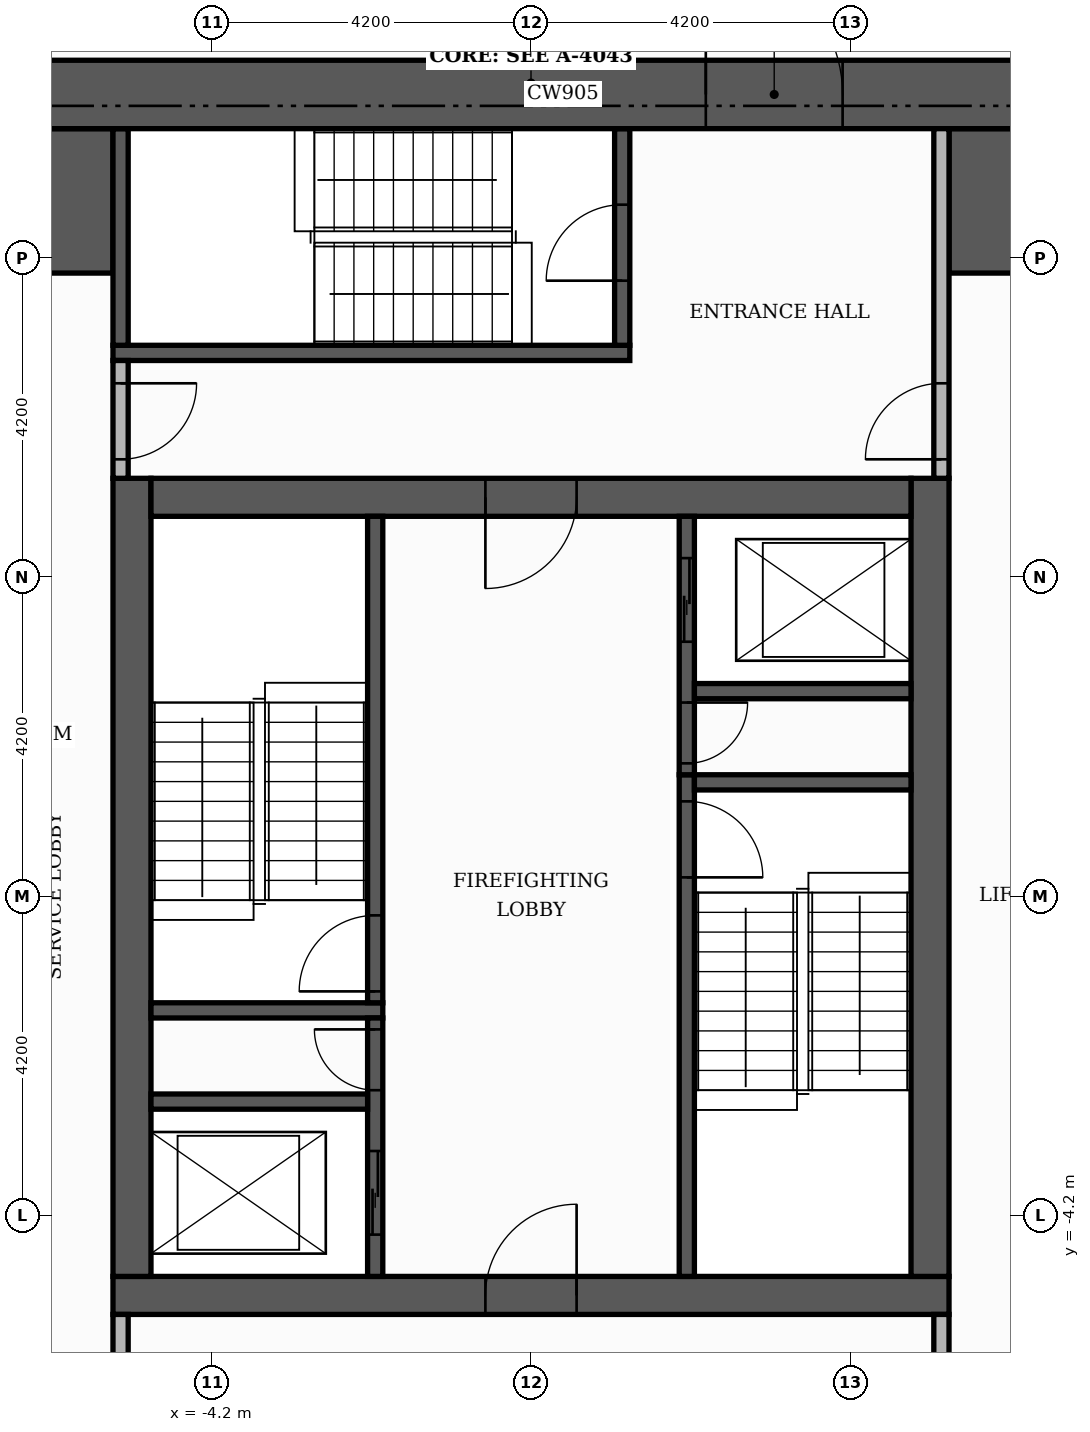
"""IFC4 building model, lengths in metres.
Left out: names, types, materials, properties, quantities, classifications, styles, units other than length and angle.
Written with IfcOpenShell. Run it as: python <this file> out.ifc"""

import sys

from ifc_helpers import new_model, si_unit, direction, frame, frame_2d, origin, place, context, subcontext, project, spatial, rectangle, extrude, element, fill, save


model = new_model("IFC4")
c1 = context("Model", 3, precision=1e-05, world=origin(), true_north=direction((0.0, 1.0)))
c2 = subcontext(c1, "Body", "Model", "MODEL_VIEW")
j1 = project(units=[si_unit("LENGTHUNIT", "METRE"), si_unit("PLANEANGLEUNIT", "RADIAN")], contexts=[c1])
p1 = place(None, origin())
s1 = spatial("IfcSite", under=j1, at=p1, CompositionType="ELEMENT")
p2 = place(p1, origin())
s2 = spatial("IfcBuilding", under=s1, at=p2, CompositionType="ELEMENT")
p3 = place(p2, frame((0.0, 0.0, 271.8)))
s3 = spatial("IfcBuildingStorey", under=s2, at=p3, CompositionType="ELEMENT", Elevation=271.8)
p4 = place(p3, frame((-5.5, -5.25, 0.0), z_axis=(0.0, 0.0, 1.0), x_axis=(1.0, 0.0, 0.0)))
e1 = element("IfcWall", 1, at=p4, inside=s3, PredefinedType="SHEAR", context=c2, shape_type="SweptSolid", body=[
    extrude(rectangle(XDim=11.0, YDim=0.5, at=frame_2d((5.5, 0.0))), origin(), (0.0, 0.0, 1.0), 3.48),
])
p5 = place(p4, frame((4.9, 0.0, 0.0)))
e2 = element("IfcOpeningElement", 2, at=p5, cuts=e1, PredefinedType="OPENING", context=c2, shape_type="SweptSolid", body=[
    extrude(rectangle(XDim=1.2, YDim=2.1, at=frame_2d((0.6, 1.05))), frame((0.0, 0.26, 0.0), z_axis=(0.0, -1.0, 0.0), x_axis=(1.0, 0.0, 0.0)), (0.0, 0.0, 1.0), 0.52),
])
for number, where, z_axis, x_axis in (
    (3, (-5.25, -5.0, 0.0), (0.0, 0.0, 1.0), (0.0, 1.0, 0.0)),
    (4, (5.25, -5.0, 0.0), (0.0, 0.0, 1.0), (0.0, 1.0, 0.0)),
):
    element("IfcWall", number, at=place(p3, frame(where, z_axis=z_axis, x_axis=x_axis)), inside=s3, PredefinedType="SHEAR", context=c2, shape_type="SweptSolid", body=[
        extrude(rectangle(XDim=10.5, YDim=0.5, at=frame_2d((5.25, 0.0))), origin(), (0.0, 0.0, 1.0), 3.48),
    ])
p6 = place(p3, frame((-5.0, 5.25, 0.0), z_axis=(0.0, 0.0, 1.0), x_axis=(1.0, 0.0, 0.0)))
e5 = element("IfcWall", 5, at=p6, inside=s3, PredefinedType="SHEAR", context=c2, shape_type="SweptSolid", body=[
    extrude(rectangle(XDim=10.0, YDim=0.5, at=frame_2d((5.0, 0.0))), origin(), (0.0, 0.0, 1.0), 3.48),
])
p7 = place(p6, frame((4.4, 0.0, 0.0)))
e6 = element("IfcOpeningElement", 6, at=p7, cuts=e5, PredefinedType="OPENING", context=c2, shape_type="SweptSolid", body=[
    extrude(rectangle(XDim=1.2, YDim=2.1, at=frame_2d((0.6, 1.05))), frame((0.0, 0.26, 0.0), z_axis=(0.0, -1.0, 0.0), x_axis=(1.0, 0.0, 0.0)), (0.0, 0.0, 1.0), 0.52),
])
for number, where, z_axis, x_axis in (
    (7, (-10.1, 9.15, 0.0), (0.0, 0.0, 1.0), (1.0, 0.0, 0.0)),
    (8, (5.5, 9.15, 0.0), (0.0, 0.0, 1.0), (1.0, 0.0, 0.0)),
):
    element("IfcWall", number, at=place(p3, frame(where, z_axis=z_axis, x_axis=x_axis)), inside=s3, PredefinedType="SHEAR", context=c2, shape_type="SweptSolid", body=[
        extrude(rectangle(XDim=4.6, YDim=1.9, at=frame_2d((2.3, 0.0))), origin(), (0.0, 0.0, 1.0), 3.48),
    ])
p8 = place(p3, frame((2.05, -5.0, 0.0), z_axis=(0.0, 0.0, 1.0), x_axis=(0.0, 1.0, 0.0)))
e9 = element("IfcWall", 9, at=p8, inside=s3, PredefinedType="SHEAR", context=c2, shape_type="SweptSolid", body=[
    extrude(rectangle(XDim=6.6, YDim=0.2, at=frame_2d((3.3, 0.0))), origin(), (0.0, 0.0, 1.0), 3.48),
])
p9 = place(p8, frame((5.25, 0.0, 0.0)))
e10 = element("IfcOpeningElement", 10, at=p9, cuts=e9, PredefinedType="OPENING", context=c2, shape_type="SweptSolid", body=[
    extrude(rectangle(XDim=1.0, YDim=2.1, at=frame_2d((0.5, 1.05))), frame((0.0, 0.11, 0.0), z_axis=(0.0, -1.0, 0.0), x_axis=(1.0, 0.0, 0.0)), (0.0, 0.0, 1.0), 0.22),
])
p10 = place(p3, frame((-5.0, -1.5, 0.0), z_axis=(0.0, 0.0, 1.0), x_axis=(1.0, 0.0, 0.0)))
e11 = element("IfcWall", 11, at=p10, inside=s3, PredefinedType="SHEAR", context=c2, shape_type="SweptSolid", body=[
    extrude(rectangle(XDim=3.05, YDim=0.2, at=frame_2d((1.525, 0.0))), origin(), (0.0, 0.0, 1.0), 3.48),
])
p11 = place(p3, frame((-2.05, -1.4, 0.0), z_axis=(0.0, 0.0, 1.0), x_axis=(0.0, 1.0, 0.0)))
e12 = element("IfcWall", 12, at=p11, inside=s3, PredefinedType="SHEAR", context=c2, shape_type="SweptSolid", body=[
    extrude(rectangle(XDim=6.4, YDim=0.2, at=frame_2d((3.2, 0.0))), origin(), (0.0, 0.0, 1.0), 3.48),
])
p12 = place(p11, frame((0.15, 0.0, 0.0)))
e13 = element("IfcOpeningElement", 13, at=p12, cuts=e12, PredefinedType="OPENING", context=c2, shape_type="SweptSolid", body=[
    extrude(rectangle(XDim=1.0, YDim=2.1, at=frame_2d((0.5, 1.05))), frame((0.0, 0.11, 0.0), z_axis=(0.0, -1.0, 0.0), x_axis=(1.0, 0.0, 0.0)), (0.0, 0.0, 1.0), 0.22),
])
p13 = place(p3, frame((2.15, 1.5, 0.0), z_axis=(0.0, 0.0, 1.0), x_axis=(1.0, 0.0, 0.0)))
e14 = element("IfcWall", 14, at=p13, inside=s3, PredefinedType="SHEAR", context=c2, shape_type="SweptSolid", body=[
    extrude(rectangle(XDim=2.85, YDim=0.2, at=frame_2d((1.425, 0.0))), origin(), (0.0, 0.0, 1.0), 3.48),
])
p14 = place(p3, frame((-5.5, 7.15, 0.0), z_axis=(0.0, 0.0, 1.0), x_axis=(1.0, 0.0, 0.0)))
e15 = element("IfcWall", 15, at=p14, inside=s3, PredefinedType="SHEAR", context=c2, shape_type="SweptSolid", body=[
    extrude(rectangle(XDim=6.8, YDim=0.2, at=frame_2d((3.4, 0.0))), origin(), (0.0, 0.0, 1.0), 3.48),
])
p15 = place(p3, frame((-5.4, 7.25, 0.0), z_axis=(0.0, 0.0, 1.0), x_axis=(0.0, 1.0, 0.0)))
e16 = element("IfcWall", 16, at=p15, inside=s3, PredefinedType="SHEAR", context=c2, shape_type="SweptSolid", body=[
    extrude(rectangle(XDim=2.85, YDim=0.2, at=frame_2d((1.425, 0.0))), origin(), (0.0, 0.0, 1.0), 3.48),
])
p16 = place(p3, frame((1.2, 7.25, 0.0), z_axis=(0.0, 0.0, 1.0), x_axis=(0.0, 1.0, 0.0)))
e17 = element("IfcWall", 17, at=p16, inside=s3, PredefinedType="SHEAR", context=c2, shape_type="SweptSolid", body=[
    extrude(rectangle(XDim=2.85, YDim=0.2, at=frame_2d((1.425, 0.0))), origin(), (0.0, 0.0, 1.0), 3.48),
])
p17 = place(p16, frame((0.85, 0.0, 0.0)))
e18 = element("IfcOpeningElement", 18, at=p17, cuts=e17, PredefinedType="OPENING", context=c2, shape_type="SweptSolid", body=[
    extrude(rectangle(XDim=1.0, YDim=2.1, at=frame_2d((0.5, 1.05))), frame((0.0, 0.11, 0.0), z_axis=(0.0, -1.0, 0.0), x_axis=(1.0, 0.0, 0.0)), (0.0, 0.0, 1.0), 0.22),
])
p18 = place(p3, frame((-2.05, -5.0, 0.0), z_axis=(0.0, 0.0, 1.0), x_axis=(0.0, 1.0, 0.0)))
e19 = element("IfcWall", 19, at=p18, inside=s3, PredefinedType="SHEAR", context=c2, shape_type="SweptSolid", body=[
    extrude(rectangle(XDim=3.4, YDim=0.2, at=frame_2d((1.7, 0.0))), origin(), (0.0, 0.0, 1.0), 3.48),
])
p19 = place(p18, frame((0.55, 0.0, 0.0)))
e20 = element("IfcOpeningElement", 20, at=p19, cuts=e19, PredefinedType="OPENING", context=c2, shape_type="SweptSolid", body=[
    extrude(rectangle(XDim=1.1, YDim=2.1, at=frame_2d((0.55, 1.05))), frame((0.0, 0.11, 0.0), z_axis=(0.0, -1.0, 0.0), x_axis=(1.0, 0.0, 0.0)), (0.0, 0.0, 1.0), 0.22),
])
p20 = place(p18, frame((2.45, 0.0, 0.0)))
e21 = element("IfcOpeningElement", 21, at=p20, cuts=e19, PredefinedType="OPENING", context=c2, shape_type="SweptSolid", body=[
    extrude(rectangle(XDim=0.8, YDim=2.1, at=frame_2d((0.4, 1.05))), frame((0.0, 0.11, 0.0), z_axis=(0.0, -1.0, 0.0), x_axis=(1.0, 0.0, 0.0)), (0.0, 0.0, 1.0), 0.22),
])
p21 = place(p3, frame((-5.0, -2.7, 0.0), z_axis=(0.0, 0.0, 1.0), x_axis=(1.0, 0.0, 0.0)))
e22 = element("IfcWall", 22, at=p21, inside=s3, PredefinedType="SHEAR", context=c2, shape_type="SweptSolid", body=[
    extrude(rectangle(XDim=2.85, YDim=0.2, at=frame_2d((1.425, 0.0))), origin(), (0.0, 0.0, 1.0), 3.48),
])
p22 = place(p3, frame((2.05, 1.6, 0.0), z_axis=(0.0, 0.0, 1.0), x_axis=(0.0, 1.0, 0.0)))
e23 = element("IfcWall", 23, at=p22, inside=s3, PredefinedType="SHEAR", context=c2, shape_type="SweptSolid", body=[
    extrude(rectangle(XDim=3.4, YDim=0.2, at=frame_2d((1.7, 0.0))), origin(), (0.0, 0.0, 1.0), 3.48),
])
p23 = place(p22, frame((1.75, 0.0, 0.0)))
e24 = element("IfcOpeningElement", 24, at=p23, cuts=e23, PredefinedType="OPENING", context=c2, shape_type="SweptSolid", body=[
    extrude(rectangle(XDim=1.1, YDim=2.1, at=frame_2d((0.55, 1.05))), frame((0.0, 0.11, 0.0), z_axis=(0.0, -1.0, 0.0), x_axis=(1.0, 0.0, 0.0)), (0.0, 0.0, 1.0), 0.22),
])
p24 = place(p22, frame((0.15, 0.0, 0.0)))
e25 = element("IfcOpeningElement", 25, at=p24, cuts=e23, PredefinedType="OPENING", context=c2, shape_type="SweptSolid", body=[
    extrude(rectangle(XDim=0.8, YDim=2.1, at=frame_2d((0.4, 1.05))), frame((0.0, 0.11, 0.0), z_axis=(0.0, -1.0, 0.0), x_axis=(1.0, 0.0, 0.0)), (0.0, 0.0, 1.0), 0.22),
])
p25 = place(p3, frame((2.15, 2.7, 0.0), z_axis=(0.0, 0.0, 1.0), x_axis=(1.0, 0.0, 0.0)))
e26 = element("IfcWall", 26, at=p25, inside=s3, PredefinedType="SHEAR", context=c2, shape_type="SweptSolid", body=[
    extrude(rectangle(XDim=2.85, YDim=0.2, at=frame_2d((1.425, 0.0))), origin(), (0.0, 0.0, 1.0), 3.48),
])
p26 = place(p3, frame((-11.0, 10.55, 0.0), z_axis=(0.0, 0.0, 1.0), x_axis=(1.0, 0.0, 0.0)))
e27 = element("IfcWall", 27, at=p26, inside=s3, PredefinedType="SHEAR", context=c2, shape_type="SweptSolid", body=[
    extrude(rectangle(XDim=22.0, YDim=0.9, at=frame_2d((11.0, 0.0))), origin(), (0.0, 0.0, 1.0), 3.48),
])
p27 = place(p26, frame((13.3, 0.0, 0.0)))
e28 = element("IfcOpeningElement", 28, at=p27, cuts=e27, PredefinedType="OPENING", context=c2, shape_type="SweptSolid", body=[
    extrude(rectangle(XDim=1.8, YDim=2.2, at=frame_2d((0.9, 1.1))), frame((0.0, 0.46, 0.0), z_axis=(0.0, -1.0, 0.0), x_axis=(1.0, 0.0, 0.0)), (0.0, 0.0, 1.0), 0.92),
])
p28 = place(p3, frame((-5.4, -10.1, 0.0), z_axis=(0.0, 0.0, 1.0), x_axis=(0.0, 1.0, 0.0)))
e29 = element("IfcWall", 29, at=p28, inside=s3, PredefinedType="PARTITIONING", context=c2, shape_type="SweptSolid", body=[
    extrude(rectangle(XDim=4.6, YDim=0.2, at=frame_2d((2.3, 0.0))), origin(), (0.0, 0.0, 1.0), 3.48),
])
p29 = place(p28, frame((2.9, 0.0, 0.0)))
e30 = element("IfcOpeningElement", 30, at=p29, cuts=e29, PredefinedType="OPENING", context=c2, shape_type="SweptSolid", body=[
    extrude(rectangle(XDim=1.0, YDim=2.1, at=frame_2d((0.5, 1.05))), frame((0.0, 0.11, 0.0), z_axis=(0.0, -1.0, 0.0), x_axis=(1.0, 0.0, 0.0)), (0.0, 0.0, 1.0), 0.22),
])
p30 = place(p3, frame((5.4, -10.1, 0.0), z_axis=(0.0, 0.0, 1.0), x_axis=(0.0, 1.0, 0.0)))
e31 = element("IfcWall", 31, at=p30, inside=s3, PredefinedType="PARTITIONING", context=c2, shape_type="SweptSolid", body=[
    extrude(rectangle(XDim=4.6, YDim=0.2, at=frame_2d((2.3, 0.0))), origin(), (0.0, 0.0, 1.0), 3.48),
])
p31 = place(p30, frame((2.9, 0.0, 0.0)))
e32 = element("IfcOpeningElement", 32, at=p31, cuts=e31, PredefinedType="OPENING", context=c2, shape_type="SweptSolid", body=[
    extrude(rectangle(XDim=1.0, YDim=2.1, at=frame_2d((0.5, 1.05))), frame((0.0, 0.11, 0.0), z_axis=(0.0, -1.0, 0.0), x_axis=(1.0, 0.0, 0.0)), (0.0, 0.0, 1.0), 0.22),
])
p32 = place(p3, frame((-5.4, 5.5, 0.0), z_axis=(0.0, 0.0, 1.0), x_axis=(0.0, 1.0, 0.0)))
e33 = element("IfcWall", 33, at=p32, inside=s3, PredefinedType="PARTITIONING", context=c2, shape_type="SweptSolid", body=[
    extrude(rectangle(XDim=1.55, YDim=0.2, at=frame_2d((0.775, 0.0))), origin(), (0.0, 0.0, 1.0), 3.48),
])
p33 = place(p32, frame((0.25, 0.0, 0.0)))
e34 = element("IfcOpeningElement", 34, at=p33, cuts=e33, PredefinedType="OPENING", context=c2, shape_type="SweptSolid", body=[
    extrude(rectangle(XDim=1.0, YDim=2.1, at=frame_2d((0.5, 1.05))), frame((0.0, 0.11, 0.0), z_axis=(0.0, -1.0, 0.0), x_axis=(1.0, 0.0, 0.0)), (0.0, 0.0, 1.0), 0.22),
])
p34 = place(p3, frame((5.4, 5.5, 0.0), z_axis=(0.0, 0.0, 1.0), x_axis=(0.0, 1.0, 0.0)))
e35 = element("IfcWall", 35, at=p34, inside=s3, PredefinedType="PARTITIONING", context=c2, shape_type="SweptSolid", body=[
    extrude(rectangle(XDim=4.6, YDim=0.2, at=frame_2d((2.3, 0.0))), origin(), (0.0, 0.0, 1.0), 3.48),
])
p35 = place(p34, frame((0.25, 0.0, 0.0)))
e36 = element("IfcOpeningElement", 36, at=p35, cuts=e35, PredefinedType="OPENING", context=c2, shape_type="SweptSolid", body=[
    extrude(rectangle(XDim=1.0, YDim=2.1, at=frame_2d((0.5, 1.05))), frame((0.0, 0.11, 0.0), z_axis=(0.0, -1.0, 0.0), x_axis=(1.0, 0.0, 0.0)), (0.0, 0.0, 1.0), 0.22),
])
p36 = place(p23, origin())
e37 = element("IfcDoor", 37, at=p36, inside=s3, OperationType="SLIDING_TO_LEFT", PredefinedType="DOOR", context=c2, shape_type="SweptSolid", body=[
    extrude(rectangle(XDim=1.1, YDim=2.1, at=frame_2d((0.55, 1.05))), frame((0.0, 0.025, 0.0), z_axis=(0.0, -1.0, 0.0), x_axis=(1.0, 0.0, 0.0)), (0.0, 0.0, 1.0), 0.05),
])
fill(e24, e37)
p37 = place(p19, origin())
e38 = element("IfcDoor", 38, at=p37, inside=s3, OperationType="SLIDING_TO_LEFT", PredefinedType="DOOR", context=c2, shape_type="SweptSolid", body=[
    extrude(rectangle(XDim=1.1, YDim=2.1, at=frame_2d((0.55, 1.05))), frame((0.0, 0.025, 0.0), z_axis=(0.0, -1.0, 0.0), x_axis=(1.0, 0.0, 0.0)), (0.0, 0.0, 1.0), 0.05),
])
fill(e20, e38)
p38 = place(p12, origin())
e39 = element("IfcDoor", 39, at=p38, inside=s3, OperationType="SINGLE_SWING_LEFT", PredefinedType="DOOR", context=c2, shape_type="SweptSolid", body=[
    extrude(rectangle(XDim=1.0, YDim=2.1, at=frame_2d((0.5, 1.05))), frame((0.0, 0.025, 0.0), z_axis=(0.0, -1.0, 0.0), x_axis=(1.0, 0.0, 0.0)), (0.0, 0.0, 1.0), 0.05),
])
fill(e13, e39)
p39 = place(p9, frame((1.0, 0.0, 0.0), z_axis=(0.0, 0.0, 1.0), x_axis=(-1.0, 0.0, 0.0)))
e40 = element("IfcDoor", 40, at=p39, inside=s3, OperationType="SINGLE_SWING_LEFT", PredefinedType="DOOR", context=c2, shape_type="SweptSolid", body=[
    extrude(rectangle(XDim=1.0, YDim=2.1, at=frame_2d((0.5, 1.05))), frame((0.0, 0.025, 0.0), z_axis=(0.0, -1.0, 0.0), x_axis=(1.0, 0.0, 0.0)), (0.0, 0.0, 1.0), 0.05),
])
fill(e10, e40)
p40 = place(p24, frame((0.8, 0.0, 0.0), z_axis=(0.0, 0.0, 1.0), x_axis=(-1.0, 0.0, 0.0)))
e41 = element("IfcDoor", 41, at=p40, inside=s3, OperationType="SINGLE_SWING_RIGHT", PredefinedType="DOOR", context=c2, shape_type="SweptSolid", body=[
    extrude(rectangle(XDim=0.8, YDim=2.1, at=frame_2d((0.4, 1.05))), frame((0.0, 0.025, 0.0), z_axis=(0.0, -1.0, 0.0), x_axis=(1.0, 0.0, 0.0)), (0.0, 0.0, 1.0), 0.05),
])
fill(e25, e41)
p41 = place(p20, origin())
e42 = element("IfcDoor", 42, at=p41, inside=s3, OperationType="SINGLE_SWING_RIGHT", PredefinedType="DOOR", context=c2, shape_type="SweptSolid", body=[
    extrude(rectangle(XDim=0.8, YDim=2.1, at=frame_2d((0.4, 1.05))), frame((0.0, 0.025, 0.0), z_axis=(0.0, -1.0, 0.0), x_axis=(1.0, 0.0, 0.0)), (0.0, 0.0, 1.0), 0.05),
])
fill(e21, e42)
p42 = place(p7, frame((1.2, 0.0, 0.0), z_axis=(0.0, 0.0, 1.0), x_axis=(-1.0, 0.0, 0.0)))
e43 = element("IfcDoor", 43, at=p42, inside=s3, OperationType="SINGLE_SWING_LEFT", PredefinedType="DOOR", context=c2, shape_type="SweptSolid", body=[
    extrude(rectangle(XDim=1.2, YDim=2.1, at=frame_2d((0.6, 1.05))), frame((0.0, 0.025, 0.0), z_axis=(0.0, -1.0, 0.0), x_axis=(1.0, 0.0, 0.0)), (0.0, 0.0, 1.0), 0.05),
])
fill(e6, e43)
p43 = place(p5, origin())
e44 = element("IfcDoor", 44, at=p43, inside=s3, OperationType="SINGLE_SWING_RIGHT", PredefinedType="DOOR", context=c2, shape_type="SweptSolid", body=[
    extrude(rectangle(XDim=1.2, YDim=2.1, at=frame_2d((0.6, 1.05))), frame((0.0, 0.025, 0.0), z_axis=(0.0, -1.0, 0.0), x_axis=(1.0, 0.0, 0.0)), (0.0, 0.0, 1.0), 0.05),
])
fill(e2, e44)
p44 = place(p17, origin())
e45 = element("IfcDoor", 45, at=p44, inside=s3, OperationType="SINGLE_SWING_LEFT", PredefinedType="DOOR", context=c2, shape_type="SweptSolid", body=[
    extrude(rectangle(XDim=1.0, YDim=2.1, at=frame_2d((0.5, 1.05))), frame((0.0, 0.025, 0.0), z_axis=(0.0, -1.0, 0.0), x_axis=(1.0, 0.0, 0.0)), (0.0, 0.0, 1.0), 0.05),
])
fill(e18, e45)
p45 = place(p33, frame((1.0, 0.0, 0.0), z_axis=(0.0, 0.0, 1.0), x_axis=(-1.0, 0.0, 0.0)))
e46 = element("IfcDoor", 46, at=p45, inside=s3, OperationType="SINGLE_SWING_RIGHT", PredefinedType="DOOR", context=c2, shape_type="SweptSolid", body=[
    extrude(rectangle(XDim=1.0, YDim=2.1, at=frame_2d((0.5, 1.05))), frame((0.0, 0.025, 0.0), z_axis=(0.0, -1.0, 0.0), x_axis=(1.0, 0.0, 0.0)), (0.0, 0.0, 1.0), 0.05),
])
fill(e34, e46)
p46 = place(p35, origin())
e47 = element("IfcDoor", 47, at=p46, inside=s3, OperationType="SINGLE_SWING_LEFT", PredefinedType="DOOR", context=c2, shape_type="SweptSolid", body=[
    extrude(rectangle(XDim=1.0, YDim=2.1, at=frame_2d((0.5, 1.05))), frame((0.0, 0.025, 0.0), z_axis=(0.0, -1.0, 0.0), x_axis=(1.0, 0.0, 0.0)), (0.0, 0.0, 1.0), 0.05),
])
fill(e36, e47)
p47 = place(p27, origin())
e48 = element("IfcDoor", 48, at=p47, inside=s3, OperationType="DOUBLE_DOOR_SINGLE_SWING", PredefinedType="DOOR", context=c2, shape_type="SweptSolid", body=[
    extrude(rectangle(XDim=1.8, YDim=2.2, at=frame_2d((0.9, 1.1))), frame((0.0, 0.025, 0.0), z_axis=(0.0, -1.0, 0.0), x_axis=(1.0, 0.0, 0.0)), (0.0, 0.0, 1.0), 0.05),
])
fill(e28, e48)
save(model, sys.argv[1])
